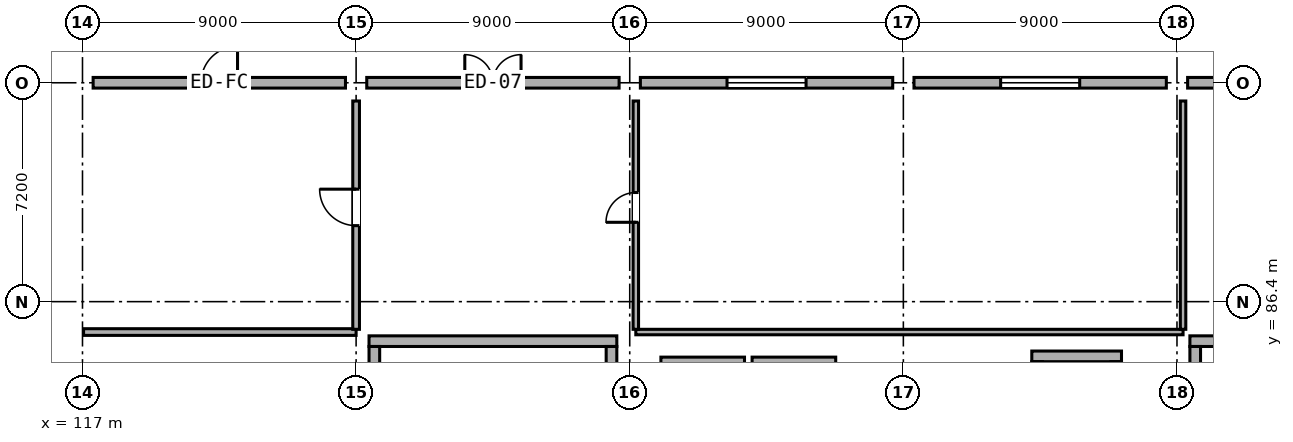
"""IFC4 building model, lengths in metres.
Left out: names, types, materials, properties, quantities, classifications, styles, units other than length and angle.
Written with IfcOpenShell. Run it as: python <this file> out.ifc"""

import sys

from ifc_helpers import new_model, si_unit, direction, frame, frame_2d, origin, origin_2d, place, context, subcontext, project, spatial, rectangle, hollow_rectangle, extrude, element, fill, save


model = new_model("IFC4")
c1 = context("Model", 3, precision=1e-05, world=origin(), true_north=direction((0.0, 1.0)))
c2 = subcontext(c1, "Body", "Model", "MODEL_VIEW")
j1 = project(units=[si_unit("LENGTHUNIT", "METRE"), si_unit("PLANEANGLEUNIT", "RADIAN")], contexts=[c1])
p1 = place(None, origin())
s1 = spatial("IfcSite", under=j1, at=p1, CompositionType="ELEMENT")
p2 = place(p1, origin())
s2 = spatial("IfcBuilding", under=s1, at=p2, CompositionType="ELEMENT")
p3 = place(p2, origin())
s3 = spatial("IfcBuildingStorey", under=s2, at=p3, CompositionType="ELEMENT", Elevation=0.0)
for number, where, z_axis, x_axis in (
    (1, (117.0, 86.4, 0.0), (0.0, 0.0, 1.0), (1.0, 0.0, 0.0)),
    (2, (117.0, 93.6, 0.0), (0.0, 0.0, 1.0), (1.0, 0.0, 0.0)),
):
    element("IfcColumn", number, at=place(p3, frame(where, z_axis=z_axis, x_axis=x_axis)), inside=s3, PredefinedType="COLUMN", context=c2, shape_type="SweptSolid", body=[
        extrude(hollow_rectangle(XDim=0.7, YDim=0.7, WallThickness=0.028, at=origin_2d()), origin(), (0.0, 0.0, 1.0), 4.8),
    ])
p4 = place(p3, frame((126.0, 86.4, 0.0), z_axis=(0.0, 0.0, 1.0), x_axis=(1.0, 0.0, 0.0)))
e3 = element("IfcColumn", 3, at=p4, inside=s3, PredefinedType="COLUMN", context=c2, shape_type="SweptSolid", body=[
    extrude(hollow_rectangle(XDim=0.75, YDim=0.75, WallThickness=0.032, at=origin_2d()), origin(), (0.0, 0.0, 1.0), 4.8),
])
p5 = place(p3, frame((126.0, 93.6, 0.0), z_axis=(0.0, 0.0, 1.0), x_axis=(1.0, 0.0, 0.0)))
e4 = element("IfcColumn", 4, at=p5, inside=s3, PredefinedType="COLUMN", context=c2, shape_type="SweptSolid", body=[
    extrude(hollow_rectangle(XDim=0.7, YDim=0.7, WallThickness=0.028, at=origin_2d()), origin(), (0.0, 0.0, 1.0), 4.8),
])
p6 = place(p3, frame((135.0, 86.4, 0.0), z_axis=(0.0, 0.0, 1.0), x_axis=(1.0, 0.0, 0.0)))
e5 = element("IfcColumn", 5, at=p6, inside=s3, PredefinedType="COLUMN", context=c2, shape_type="SweptSolid", body=[
    extrude(hollow_rectangle(XDim=0.75, YDim=0.75, WallThickness=0.032, at=origin_2d()), origin(), (0.0, 0.0, 1.0), 4.8),
])
p7 = place(p3, frame((135.0, 93.6, 0.0), z_axis=(0.0, 0.0, 1.0), x_axis=(1.0, 0.0, 0.0)))
e6 = element("IfcColumn", 6, at=p7, inside=s3, PredefinedType="COLUMN", context=c2, shape_type="SweptSolid", body=[
    extrude(hollow_rectangle(XDim=0.7, YDim=0.7, WallThickness=0.028, at=origin_2d()), origin(), (0.0, 0.0, 1.0), 4.8),
])
p8 = place(p3, frame((144.0, 86.4, 0.0), z_axis=(0.0, 0.0, 1.0), x_axis=(1.0, 0.0, 0.0)))
e7 = element("IfcColumn", 7, at=p8, inside=s3, PredefinedType="COLUMN", context=c2, shape_type="SweptSolid", body=[
    extrude(hollow_rectangle(XDim=0.75, YDim=0.75, WallThickness=0.032, at=origin_2d()), origin(), (0.0, 0.0, 1.0), 4.8),
])
p9 = place(p3, frame((144.0, 93.6, 0.0), z_axis=(0.0, 0.0, 1.0), x_axis=(1.0, 0.0, 0.0)))
e8 = element("IfcColumn", 8, at=p9, inside=s3, PredefinedType="COLUMN", context=c2, shape_type="SweptSolid", body=[
    extrude(hollow_rectangle(XDim=0.7, YDim=0.7, WallThickness=0.028, at=origin_2d()), origin(), (0.0, 0.0, 1.0), 4.8),
])
p10 = place(p3, frame((153.0, 86.4, 0.0), z_axis=(0.0, 0.0, 1.0), x_axis=(1.0, 0.0, 0.0)))
e9 = element("IfcColumn", 9, at=p10, inside=s3, PredefinedType="COLUMN", context=c2, shape_type="SweptSolid", body=[
    extrude(hollow_rectangle(XDim=0.75, YDim=0.75, WallThickness=0.032, at=origin_2d()), origin(), (0.0, 0.0, 1.0), 4.8),
])
p11 = place(p3, frame((153.0, 93.6, 0.0), z_axis=(0.0, 0.0, 1.0), x_axis=(1.0, 0.0, 0.0)))
e10 = element("IfcColumn", 10, at=p11, inside=s3, PredefinedType="COLUMN", context=c2, shape_type="SweptSolid", body=[
    extrude(hollow_rectangle(XDim=0.7, YDim=0.7, WallThickness=0.028, at=origin_2d()), origin(), (0.0, 0.0, 1.0), 4.8),
])
p12 = place(p3, frame((125.65, 93.6, 0.0), z_axis=(0.0, 0.0, 1.0), x_axis=(-1.0, 0.0, 0.0)))
e11 = element("IfcWall", 11, at=p12, inside=s3, PredefinedType="STANDARD", context=c2, shape_type="SweptSolid", body=[
    extrude(rectangle(XDim=8.3, YDim=0.35, at=frame_2d((4.15, 0.0))), origin(), (0.0, 0.0, 1.0), 4.055),
])
p13 = place(p12, frame((3.55, 0.0, 0.0)))
e12 = element("IfcOpeningElement", 12, at=p13, cuts=e11, PredefinedType="OPENING", context=c2, shape_type="SweptSolid", body=[
    extrude(rectangle(XDim=1.2, YDim=2.2, at=frame_2d((0.6, 1.1))), frame((0.0, 0.187, 0.0), z_axis=(0.0, -1.0, 0.0), x_axis=(1.0, 0.0, 0.0)), (0.0, 0.0, 1.0), 0.374),
])
p14 = place(p3, frame((134.65, 93.6, 0.0), z_axis=(0.0, 0.0, 1.0), x_axis=(-1.0, 0.0, 0.0)))
e13 = element("IfcWall", 13, at=p14, inside=s3, PredefinedType="STANDARD", context=c2, shape_type="SweptSolid", body=[
    extrude(rectangle(XDim=8.3, YDim=0.35, at=frame_2d((4.15, 0.0))), origin(), (0.0, 0.0, 1.0), 4.055),
])
p15 = place(p14, frame((3.225, 0.0, 0.0)))
e14 = element("IfcOpeningElement", 14, at=p15, cuts=e13, PredefinedType="OPENING", context=c2, shape_type="SweptSolid", body=[
    extrude(rectangle(XDim=1.85, YDim=2.35, at=frame_2d((0.925, 1.175))), frame((0.0, 0.187, 0.0), z_axis=(0.0, -1.0, 0.0), x_axis=(1.0, 0.0, 0.0)), (0.0, 0.0, 1.0), 0.374),
])
p16 = place(p3, frame((143.65, 93.6, 0.0), z_axis=(0.0, 0.0, 1.0), x_axis=(-1.0, 0.0, 0.0)))
e15 = element("IfcWall", 15, at=p16, inside=s3, PredefinedType="STANDARD", context=c2, shape_type="SweptSolid", body=[
    extrude(rectangle(XDim=8.3, YDim=0.35, at=frame_2d((4.15, 0.0))), origin(), (0.0, 0.0, 1.0), 4.055),
])
p17 = place(p16, frame((2.85, 0.0, 0.85)))
e16 = element("IfcOpeningElement", 16, at=p17, cuts=e15, PredefinedType="OPENING", context=c2, shape_type="SweptSolid", body=[
    extrude(rectangle(XDim=2.6, YDim=1.6, at=frame_2d((1.3, 0.8))), frame((0.0, 0.187, 0.0), z_axis=(0.0, -1.0, 0.0), x_axis=(1.0, 0.0, 0.0)), (0.0, 0.0, 1.0), 0.374),
])
p18 = place(p3, frame((152.65, 93.6, 0.0), z_axis=(0.0, 0.0, 1.0), x_axis=(-1.0, 0.0, 0.0)))
e17 = element("IfcWall", 17, at=p18, inside=s3, PredefinedType="STANDARD", context=c2, shape_type="SweptSolid", body=[
    extrude(rectangle(XDim=8.3, YDim=0.35, at=frame_2d((4.15, 0.0))), origin(), (0.0, 0.0, 1.0), 4.055),
])
p19 = place(p18, frame((2.85, 0.0, 0.85)))
e18 = element("IfcOpeningElement", 18, at=p19, cuts=e17, PredefinedType="OPENING", context=c2, shape_type="SweptSolid", body=[
    extrude(rectangle(XDim=2.6, YDim=1.6, at=frame_2d((1.3, 0.8))), frame((0.0, 0.187, 0.0), z_axis=(0.0, -1.0, 0.0), x_axis=(1.0, 0.0, 0.0)), (0.0, 0.0, 1.0), 0.374),
])
p20 = place(p3, frame((161.65, 93.6, 0.0), z_axis=(0.0, 0.0, 1.0), x_axis=(-1.0, 0.0, 0.0)))
e19 = element("IfcWall", 19, at=p20, inside=s3, PredefinedType="STANDARD", context=c2, shape_type="SweptSolid", body=[
    extrude(rectangle(XDim=8.3, YDim=0.35, at=frame_2d((4.15, 0.0))), origin(), (0.0, 0.0, 1.0), 4.055),
])
p21 = place(p20, frame((2.85, 0.0, 0.85)))
e20 = element("IfcOpeningElement", 20, at=p21, cuts=e19, PredefinedType="OPENING", context=c2, shape_type="SweptSolid", body=[
    extrude(rectangle(XDim=2.6, YDim=1.6, at=frame_2d((1.3, 0.8))), frame((0.0, 0.187, 0.0), z_axis=(0.0, -1.0, 0.0), x_axis=(1.0, 0.0, 0.0)), (0.0, 0.0, 1.0), 0.374),
])
p22 = place(p3, frame((126.425, 85.1, 0.0), z_axis=(0.0, 0.0, 1.0), x_axis=(1.0, 0.0, 0.0)))
e21 = element("IfcWall", 21, at=p22, inside=s3, PredefinedType="SHEAR", context=c2, shape_type="SweptSolid", body=[
    extrude(rectangle(XDim=8.15, YDim=0.35, at=frame_2d((4.075, 0.0))), origin(), (0.0, 0.0, 1.0), 4.555),
])
for number, where, z_axis, x_axis in (
    (22, (126.6, 81.375, 0.0), (0.0, 0.0, 1.0), (0.0, 1.0, 0.0)),
    (23, (134.4, 81.375, 0.0), (0.0, 0.0, 1.0), (0.0, 1.0, 0.0)),
):
    element("IfcWall", number, at=place(p3, frame(where, z_axis=z_axis, x_axis=x_axis)), inside=s3, PredefinedType="SHEAR", context=c2, shape_type="SweptSolid", body=[
        extrude(rectangle(XDim=3.55, YDim=0.35, at=frame_2d((1.775, 0.0))), origin(), (0.0, 0.0, 1.0), 4.555),
    ])
p23 = place(p3, frame((153.425, 85.1, 0.0), z_axis=(0.0, 0.0, 1.0), x_axis=(1.0, 0.0, 0.0)))
e24 = element("IfcWall", 24, at=p23, inside=s3, PredefinedType="SHEAR", context=c2, shape_type="SweptSolid", body=[
    extrude(rectangle(XDim=8.15, YDim=0.35, at=frame_2d((4.075, 0.0))), origin(), (0.0, 0.0, 1.0), 4.555),
])
p24 = place(p3, frame((153.6, 81.375, 0.0), z_axis=(0.0, 0.0, 1.0), x_axis=(0.0, 1.0, 0.0)))
e25 = element("IfcWall", 25, at=p24, inside=s3, PredefinedType="SHEAR", context=c2, shape_type="SweptSolid", body=[
    extrude(rectangle(XDim=3.55, YDim=0.35, at=frame_2d((1.775, 0.0))), origin(), (0.0, 0.0, 1.0), 4.555),
])
for number, where, z_axis, x_axis in (
    (26, (136.025, 84.4, 0.0), (0.0, 0.0, 1.0), (1.0, 0.0, 0.0)),
    (27, (139.025, 84.4, 0.0), (0.0, 0.0, 1.0), (1.0, 0.0, 0.0)),
):
    element("IfcWall", number, at=place(p3, frame(where, z_axis=z_axis, x_axis=x_axis)), inside=s3, PredefinedType="SHEAR", context=c2, shape_type="SweptSolid", body=[
        extrude(rectangle(XDim=2.75, YDim=0.35, at=frame_2d((1.375, 0.0))), origin(), (0.0, 0.0, 1.0), 4.555),
    ])
p25 = place(p3, frame((148.225, 84.6, 0.0), z_axis=(0.0, 0.0, 1.0), x_axis=(1.0, 0.0, 0.0)))
e28 = element("IfcWall", 28, at=p25, inside=s3, PredefinedType="SHEAR", context=c2, shape_type="SweptSolid", body=[
    extrude(rectangle(XDim=2.95, YDim=0.35, at=frame_2d((1.475, 0.0))), origin(), (0.0, 0.0, 1.0), 4.555),
])
for number, where, z_axis, x_axis in (
    (29, (148.4, 81.375, 0.0), (0.0, 0.0, 1.0), (0.0, 1.0, 0.0)),
    (30, (151.0, 81.375, 0.0), (0.0, 0.0, 1.0), (0.0, 1.0, 0.0)),
):
    element("IfcWall", number, at=place(p3, frame(where, z_axis=z_axis, x_axis=x_axis)), inside=s3, PredefinedType="SHEAR", context=c2, shape_type="SweptSolid", body=[
        extrude(rectangle(XDim=3.05, YDim=0.35, at=frame_2d((1.525, 0.0))), origin(), (0.0, 0.0, 1.0), 4.555),
    ])
p26 = place(p3, frame((117.035, 85.4, 0.0), z_axis=(0.0, 0.0, 1.0), x_axis=(1.0, 0.0, 0.0)))
e31 = element("IfcWall", 31, at=p26, inside=s3, PredefinedType="PARTITIONING", context=c2, shape_type="SweptSolid", body=[
    extrude(rectangle(XDim=8.965, YDim=0.22, at=frame_2d((4.482, 0.0))), origin(), (0.0, 0.0, 1.0), 4.555),
])
p27 = place(p3, frame((126.0, 85.49, 0.0), z_axis=(0.0, 0.0, 1.0), x_axis=(0.0, 1.0, 0.0)))
e32 = element("IfcWall", 32, at=p27, inside=s3, PredefinedType="PARTITIONING", context=c2, shape_type="SweptSolid", body=[
    extrude(rectangle(XDim=7.51, YDim=0.22, at=frame_2d((3.755, 0.0))), origin(), (0.0, 0.0, 1.0), 3.835),
])
p28 = place(p27, frame((3.41, 0.0, 0.0)))
e33 = element("IfcOpeningElement", 33, at=p28, cuts=e32, PredefinedType="OPENING", context=c2, shape_type="SweptSolid", body=[
    extrude(rectangle(XDim=1.2, YDim=2.1, at=frame_2d((0.6, 1.05))), frame((0.0, 0.122, 0.0), z_axis=(0.0, -1.0, 0.0), x_axis=(1.0, 0.0, 0.0)), (0.0, 0.0, 1.0), 0.244),
])
p29 = place(p3, frame((135.2, 85.4, 0.0), z_axis=(0.0, 0.0, 1.0), x_axis=(1.0, 0.0, 0.0)))
e34 = element("IfcWall", 34, at=p29, inside=s3, PredefinedType="PARTITIONING", context=c2, shape_type="SweptSolid", body=[
    extrude(rectangle(XDim=18.0, YDim=0.18, at=frame_2d((9.0, 0.0))), origin(), (0.0, 0.0, 1.0), 4.555),
])
p30 = place(p3, frame((135.2, 85.49, 0.0), z_axis=(0.0, 0.0, 1.0), x_axis=(0.0, 1.0, 0.0)))
e35 = element("IfcWall", 35, at=p30, inside=s3, PredefinedType="PARTITIONING", context=c2, shape_type="SweptSolid", body=[
    extrude(rectangle(XDim=7.51, YDim=0.18, at=frame_2d((3.755, 0.0))), origin(), (0.0, 0.0, 1.0), 3.835),
])
p31 = place(p30, frame((3.52, 0.0, 0.0)))
e36 = element("IfcOpeningElement", 36, at=p31, cuts=e35, PredefinedType="OPENING", context=c2, shape_type="SweptSolid", body=[
    extrude(rectangle(XDim=0.98, YDim=2.02, at=frame_2d((0.49, 1.01))), frame((0.0, 0.102, 0.0), z_axis=(0.0, -1.0, 0.0), x_axis=(1.0, 0.0, 0.0)), (0.0, 0.0, 1.0), 0.204),
])
p32 = place(p3, frame((153.2, 85.49, 0.0), z_axis=(0.0, 0.0, 1.0), x_axis=(0.0, 1.0, 0.0)))
e37 = element("IfcWall", 37, at=p32, inside=s3, PredefinedType="PARTITIONING", context=c2, shape_type="SweptSolid", body=[
    extrude(rectangle(XDim=7.51, YDim=0.18, at=frame_2d((3.755, 0.0))), origin(), (0.0, 0.0, 1.0), 3.835),
])
p33 = place(p13, frame((1.2, 0.0, 0.0), z_axis=(0.0, 0.0, 1.0), x_axis=(-1.0, 0.0, 0.0)))
e38 = element("IfcDoor", 38, at=p33, inside=s3, OperationType="SINGLE_SWING_RIGHT", PredefinedType="DOOR", context=c2, shape_type="SweptSolid", body=[
    extrude(rectangle(XDim=1.2, YDim=2.2, at=frame_2d((0.6, 1.1))), frame((0.0, 0.025, 0.0), z_axis=(0.0, -1.0, 0.0), x_axis=(1.0, 0.0, 0.0)), (0.0, 0.0, 1.0), 0.05),
])
fill(e12, e38)
p34 = place(p15, frame((1.85, 0.0, 0.0), z_axis=(0.0, 0.0, 1.0), x_axis=(-1.0, 0.0, 0.0)))
e39 = element("IfcDoor", 39, at=p34, inside=s3, OperationType="DOUBLE_DOOR_SINGLE_SWING", PredefinedType="DOOR", context=c2, shape_type="SweptSolid", body=[
    extrude(rectangle(XDim=1.85, YDim=2.35, at=frame_2d((0.925, 1.175))), frame((0.0, 0.025, 0.0), z_axis=(0.0, -1.0, 0.0), x_axis=(1.0, 0.0, 0.0)), (0.0, 0.0, 1.0), 0.05),
])
fill(e14, e39)
p35 = place(p17, origin())
e40 = element("IfcWindow", 40, at=p35, inside=s3, PartitioningType="DOUBLE_PANEL_VERTICAL", PredefinedType="WINDOW", context=c2, shape_type="SweptSolid", body=[
    extrude(rectangle(XDim=2.6, YDim=1.6, at=frame_2d((1.3, 0.8))), frame((0.0, 0.03, 0.0), z_axis=(0.0, -1.0, 0.0), x_axis=(1.0, 0.0, 0.0)), (0.0, 0.0, 1.0), 0.06),
])
fill(e16, e40)
p36 = place(p19, origin())
e41 = element("IfcWindow", 41, at=p36, inside=s3, PartitioningType="DOUBLE_PANEL_VERTICAL", PredefinedType="WINDOW", context=c2, shape_type="SweptSolid", body=[
    extrude(rectangle(XDim=2.6, YDim=1.6, at=frame_2d((1.3, 0.8))), frame((0.0, 0.03, 0.0), z_axis=(0.0, -1.0, 0.0), x_axis=(1.0, 0.0, 0.0)), (0.0, 0.0, 1.0), 0.06),
])
fill(e18, e41)
p37 = place(p28, origin())
e42 = element("IfcDoor", 42, at=p37, inside=s3, OperationType="SINGLE_SWING_RIGHT", PredefinedType="DOOR", context=c2, shape_type="SweptSolid", body=[
    extrude(rectangle(XDim=1.2, YDim=2.1, at=frame_2d((0.6, 1.05))), frame((0.0, 0.025, 0.0), z_axis=(0.0, -1.0, 0.0), x_axis=(1.0, 0.0, 0.0)), (0.0, 0.0, 1.0), 0.05),
])
fill(e33, e42)
p38 = place(p31, origin())
e43 = element("IfcDoor", 43, at=p38, inside=s3, OperationType="SINGLE_SWING_LEFT", PredefinedType="DOOR", context=c2, shape_type="SweptSolid", body=[
    extrude(rectangle(XDim=0.98, YDim=2.02, at=frame_2d((0.49, 1.01))), frame((0.0, 0.025, 0.0), z_axis=(0.0, -1.0, 0.0), x_axis=(1.0, 0.0, 0.0)), (0.0, 0.0, 1.0), 0.05),
])
fill(e36, e43)
save(model, sys.argv[1])
